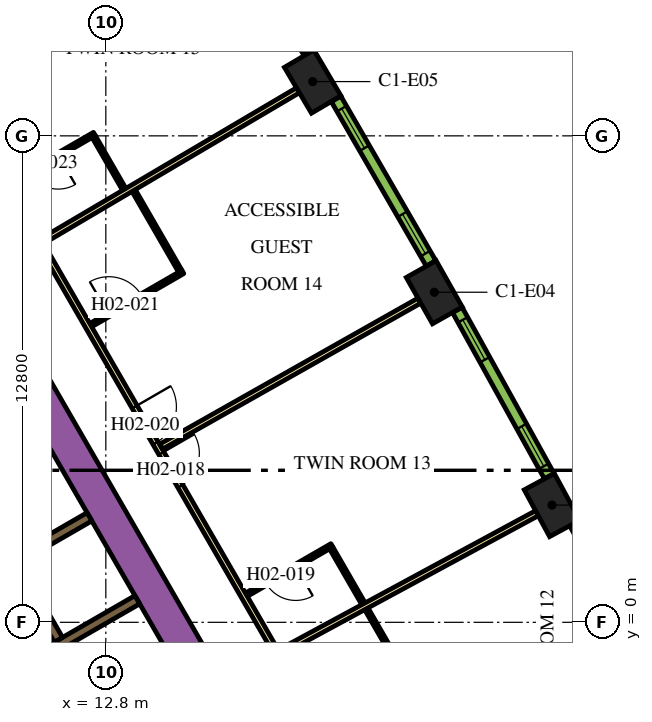
"""IFC4 building model, lengths in metres.
Left out: names, types, materials, properties, quantities, classifications, styles, units other than length and angle.
Written with IfcOpenShell. Run it as: python <this file> out.ifc"""

import sys

from ifc_helpers import new_model, si_unit, direction, frame, frame_2d, origin, origin_2d, place, context, subcontext, project, spatial, rectangle, extrude, element, fill, save


model = new_model("IFC4")
c1 = context("Model", 3, precision=1e-05, world=origin(), true_north=direction((0.0, 1.0)))
c2 = subcontext(c1, "Body", "Model", "MODEL_VIEW")
j1 = project(units=[si_unit("LENGTHUNIT", "METRE"), si_unit("PLANEANGLEUNIT", "RADIAN")], contexts=[c1])
p1 = place(None, origin())
s1 = spatial("IfcSite", under=j1, at=p1, CompositionType="ELEMENT")
p2 = place(p1, origin())
s2 = spatial("IfcBuilding", under=s1, at=p2, CompositionType="ELEMENT")
p3 = place(p2, frame((0.0, 0.0, 47.1)))
s3 = spatial("IfcBuildingStorey", under=s2, at=p3, CompositionType="ELEMENT", Elevation=47.1)
for number, where, z_axis, x_axis in (
    (1, (24.54, 3.085, 0.0), (0.0, 0.0, 1.0), (-0.476, 0.88, 0.0)),
    (2, (21.443, 8.685, 0.0), (0.0, 0.0, 1.0), (-0.492, 0.871, 0.0)),
    (3, (18.243, 14.228, 0.0), (0.0, 0.0, 1.0), (-0.508, 0.861, 0.0)),
):
    element("IfcColumn", number, at=place(p3, frame(where, z_axis=z_axis, x_axis=x_axis)), inside=s3, PredefinedType="COLUMN", context=c2, shape_type="SweptSolid", body=[
        extrude(rectangle(XDim=1.4, YDim=0.9, at=origin_2d()), origin(), (0.0, 0.0, 1.0), 3.9),
    ])
p4 = place(p3, frame((6.776, 13.364, 0.0), z_axis=(0.0, 0.0, 1.0), x_axis=(0.500004177138, -0.8660229921, 0.0)))
e4 = element("IfcWall", 4, at=p4, inside=s3, PredefinedType="SOLIDWALL", context=c2, shape_type="SweptSolid", body=[
    extrude(rectangle(XDim=20.204, YDim=0.9, at=frame_2d((10.102, 0.0))), origin(), (0.0, 0.0, 1.0), 3.9),
])
p5 = place(p3, frame((10.464, 1.677, 0.0), z_axis=(0.0, 0.0, 1.0), x_axis=(0.86605622881, 0.499946605688, 0.0)))
e5 = element("IfcWall", 5, at=p5, inside=s3, PredefinedType="SOLIDWALL", context=c2, shape_type="SweptSolid", body=[
    extrude(rectangle(XDim=2.2, YDim=0.25, at=frame_2d((1.1, 0.0))), origin(), (0.0, 0.0, 1.0), 3.9),
])
p6 = place(p3, frame((13.629, 0.594, 0.0), z_axis=(0.0, 0.0, 1.0), x_axis=(-0.86602790099, -0.499995674689, 0.0)))
e6 = element("IfcWall", 6, at=p6, inside=s3, PredefinedType="SOLIDWALL", context=c2, shape_type="SweptSolid", body=[
    extrude(rectangle(XDim=3.146, YDim=0.25, at=frame_2d((1.573, 0.0))), origin(), (0.0, 0.0, 1.0), 3.9),
])
p7 = place(p3, frame((11.553, -0.46, 0.0), z_axis=(0.0, 0.0, 1.0), x_axis=(-0.500006514828, 0.866021642414, 0.0)))
e7 = element("IfcWall", 7, at=p7, inside=s3, PredefinedType="SOLIDWALL", context=c2, shape_type="SweptSolid", body=[
    extrude(rectangle(XDim=12.35, YDim=0.25, at=frame_2d((6.175, 0.0))), origin(), (0.0, 0.0, 1.0), 3.9),
])
p8 = place(p7, frame((0.585, 0.0, 0.0)))
e8 = element("IfcOpeningElement", 8, at=p8, cuts=e7, PredefinedType="OPENING", context=c2, shape_type="SweptSolid", body=[
    extrude(rectangle(XDim=1.1, YDim=2.1, at=frame_2d((0.55, 1.05))), frame((0.0, 0.135, 0.0), z_axis=(0.0, -1.0, 0.0), x_axis=(1.0, 0.0, 0.0)), (0.0, 0.0, 1.0), 0.27),
])
p9 = place(p7, frame((3.105, 0.0, 0.0)))
e9 = element("IfcOpeningElement", 9, at=p9, cuts=e7, PredefinedType="OPENING", context=c2, shape_type="SweptSolid", body=[
    extrude(rectangle(XDim=1.1, YDim=2.1, at=frame_2d((0.55, 1.05))), frame((0.0, 0.135, 0.0), z_axis=(0.0, -1.0, 0.0), x_axis=(1.0, 0.0, 0.0)), (0.0, 0.0, 1.0), 0.27),
])
p10 = place(p7, frame((5.625, 0.0, 0.0)))
e10 = element("IfcOpeningElement", 10, at=p10, cuts=e7, PredefinedType="OPENING", context=c2, shape_type="SweptSolid", body=[
    extrude(rectangle(XDim=1.1, YDim=2.1, at=frame_2d((0.55, 1.05))), frame((0.0, 0.135, 0.0), z_axis=(0.0, -1.0, 0.0), x_axis=(1.0, 0.0, 0.0)), (0.0, 0.0, 1.0), 0.27),
])
p11 = place(p3, frame((6.163, 18.475, 0.0), z_axis=(0.0, 0.0, 1.0), x_axis=(0.500001317485, -0.866024643133, 0.0)))
e11 = element("IfcWall", 11, at=p11, inside=s3, PredefinedType="PARTITIONING", context=c2, shape_type="SweptSolid", body=[
    extrude(rectangle(XDim=25.767, YDim=0.15, at=frame_2d((12.883, 0.0))), origin(), (0.0, 0.0, 1.0), 2.75),
])
p12 = place(p11, frame((24.586, 0.0, 0.0)))
e12 = element("IfcOpeningElement", 12, at=p12, cuts=e11, PredefinedType="OPENING", context=c2, shape_type="SweptSolid", body=[
    extrude(rectangle(XDim=1.0, YDim=2.1, at=frame_2d((0.5, 1.05))), frame((0.0, 0.085, 0.0), z_axis=(0.0, -1.0, 0.0), x_axis=(1.0, 0.0, 0.0)), (0.0, 0.0, 1.0), 0.17),
])
p13 = place(p11, frame((16.196, 0.0, 0.0)))
e13 = element("IfcOpeningElement", 13, at=p13, cuts=e11, PredefinedType="OPENING", context=c2, shape_type="SweptSolid", body=[
    extrude(rectangle(XDim=1.0, YDim=2.1, at=frame_2d((0.5, 1.05))), frame((0.0, 0.085, 0.0), z_axis=(0.0, -1.0, 0.0), x_axis=(1.0, 0.0, 0.0)), (0.0, 0.0, 1.0), 0.17),
])
p14 = place(p11, frame((14.789, 0.0, 0.0)))
e14 = element("IfcOpeningElement", 14, at=p14, cuts=e11, PredefinedType="OPENING", context=c2, shape_type="SweptSolid", body=[
    extrude(rectangle(XDim=1.1, YDim=2.1, at=frame_2d((0.55, 1.05))), frame((0.0, 0.085, 0.0), z_axis=(0.0, -1.0, 0.0), x_axis=(1.0, 0.0, 0.0)), (0.0, 0.0, 1.0), 0.17),
])
p15 = place(p11, frame((3.698, 0.0, 0.0)))
e15 = element("IfcOpeningElement", 15, at=p15, cuts=e11, PredefinedType="OPENING", context=c2, shape_type="SweptSolid", body=[
    extrude(rectangle(XDim=1.0, YDim=2.1, at=frame_2d((0.5, 1.05))), frame((0.0, 0.085, 0.0), z_axis=(0.0, -1.0, 0.0), x_axis=(1.0, 0.0, 0.0)), (0.0, 0.0, 1.0), 0.17),
])
p16 = place(p11, frame((2.391, 0.0, 0.0)))
e16 = element("IfcOpeningElement", 16, at=p16, cuts=e11, PredefinedType="OPENING", context=c2, shape_type="SweptSolid", body=[
    extrude(rectangle(XDim=1.0, YDim=2.1, at=frame_2d((0.5, 1.05))), frame((0.0, 0.085, 0.0), z_axis=(0.0, -1.0, 0.0), x_axis=(1.0, 0.0, 0.0)), (0.0, 0.0, 1.0), 0.17),
])
p17 = place(p3, frame((17.856, 13.999, 0.0), z_axis=(0.0, 0.0, 1.0), x_axis=(-0.861371519381, -0.507975497047, 0.0)))
e17 = element("IfcWall", 17, at=p17, inside=s3, PredefinedType="PARTITIONING", context=c2, shape_type="SweptSolid", body=[
    extrude(rectangle(XDim=7.804, YDim=0.15, at=frame_2d((3.902, 0.0))), origin(), (0.0, 0.0, 1.0), 2.75),
])
p18 = place(p3, frame((21.052, 8.464, 0.0), z_axis=(0.0, 0.0, 1.0), x_axis=(-0.87059371954, -0.492002617368, 0.0)))
e18 = element("IfcWall", 18, at=p18, inside=s3, PredefinedType="PARTITIONING", context=c2, shape_type="SweptSolid", body=[
    extrude(rectangle(XDim=7.803, YDim=0.15, at=frame_2d((3.902, 0.0))), origin(), (0.0, 0.0, 1.0), 2.75),
])
p19 = place(p3, frame((24.145, 2.871, 0.0), z_axis=(0.0, 0.0, 1.0), x_axis=(-0.879551725039, -0.475803281809, 0.0)))
e19 = element("IfcWall", 19, at=p19, inside=s3, PredefinedType="PARTITIONING", context=c2, shape_type="SweptSolid", body=[
    extrude(rectangle(XDim=7.688, YDim=0.15, at=frame_2d((3.844, 0.0))), origin(), (0.0, 0.0, 1.0), 2.75),
])
p20 = place(p3, frame((20.434, -0.993, 0.0), z_axis=(0.0, 0.0, 1.0), x_axis=(-0.500086022567, 0.865975732936, 0.0)))
e20 = element("IfcWall", 20, at=p20, inside=s3, PredefinedType="PARTITIONING", context=c2, shape_type="SweptSolid", body=[
    extrude(rectangle(XDim=1.55, YDim=0.1, at=frame_2d((0.775, 0.0))), origin(), (0.0, 0.0, 1.0), 2.75),
])
p21 = place(p3, frame((18.749, 2.026, 0.0), z_axis=(0.0, 0.0, 1.0), x_axis=(-0.866021400173, -0.500006934395, 0.0)))
e21 = element("IfcWall", 21, at=p21, inside=s3, PredefinedType="PARTITIONING", context=c2, shape_type="SweptSolid", body=[
    extrude(rectangle(XDim=2.6, YDim=0.1, at=frame_2d((1.3, 0.0))), origin(), (0.0, 0.0, 1.0), 2.75),
])
p22 = place(p21, frame((1.1, 0.0, 0.0)))
e22 = element("IfcOpeningElement", 22, at=p22, cuts=e21, PredefinedType="OPENING", context=c2, shape_type="SweptSolid", body=[
    extrude(rectangle(XDim=0.9, YDim=2.1, at=frame_2d((0.45, 1.05))), frame((0.0, 0.06, 0.0), z_axis=(0.0, -1.0, 0.0), x_axis=(1.0, 0.0, 0.0)), (0.0, 0.0, 1.0), 0.12),
])
p23 = place(p3, frame((18.731, 1.958, 0.0), z_axis=(0.0, 0.0, 1.0), x_axis=(0.499976720371, -0.866038843867, 0.0)))
e23 = element("IfcWall", 23, at=p23, inside=s3, PredefinedType="PARTITIONING", context=c2, shape_type="SweptSolid", body=[
    extrude(rectangle(XDim=1.69, YDim=0.1, at=frame_2d((0.845, 0.0))), origin(), (0.0, 0.0, 1.0), 2.75),
])
p24 = place(p3, frame((12.402, 7.819, 0.0), z_axis=(0.0, 0.0, 1.0), x_axis=(0.866034573852, 0.49998411664, 0.0)))
e24 = element("IfcWall", 24, at=p24, inside=s3, PredefinedType="PARTITIONING", context=c2, shape_type="SweptSolid", body=[
    extrude(rectangle(XDim=2.8, YDim=0.1, at=frame_2d((1.4, 0.0))), origin(), (0.0, 0.0, 1.0), 2.75),
])
p25 = place(p24, frame((0.55, 0.0, 0.0)))
e25 = element("IfcOpeningElement", 25, at=p25, cuts=e24, PredefinedType="OPENING", context=c2, shape_type="SweptSolid", body=[
    extrude(rectangle(XDim=1.0, YDim=2.1, at=frame_2d((0.5, 1.05))), frame((0.0, 0.06, 0.0), z_axis=(0.0, -1.0, 0.0), x_axis=(1.0, 0.0, 0.0)), (0.0, 0.0, 1.0), 0.12),
])
p26 = place(p3, frame((14.759, 9.237, 0.0), z_axis=(0.0, 0.0, 1.0), x_axis=(-0.499943856944, 0.866057815567, 0.0)))
e26 = element("IfcWall", 26, at=p26, inside=s3, PredefinedType="PARTITIONING", context=c2, shape_type="SweptSolid", body=[
    extrude(rectangle(XDim=2.45, YDim=0.1, at=frame_2d((1.225, 0.0))), origin(), (0.0, 0.0, 1.0), 2.75),
])
p27 = place(p3, frame((12.5, 12.849, 0.0), z_axis=(0.0, 0.0, 1.0), x_axis=(-0.866021400173, -0.500006934395, 0.0)))
e27 = element("IfcWall", 27, at=p27, inside=s3, PredefinedType="PARTITIONING", context=c2, shape_type="SweptSolid", body=[
    extrude(rectangle(XDim=2.6, YDim=0.1, at=frame_2d((1.3, 0.0))), origin(), (0.0, 0.0, 1.0), 2.75),
])
p28 = place(p27, frame((1.1, 0.0, 0.0)))
e28 = element("IfcOpeningElement", 28, at=p28, cuts=e27, PredefinedType="OPENING", context=c2, shape_type="SweptSolid", body=[
    extrude(rectangle(XDim=0.9, YDim=2.1, at=frame_2d((0.45, 1.05))), frame((0.0, 0.06, 0.0), z_axis=(0.0, -1.0, 0.0), x_axis=(1.0, 0.0, 0.0)), (0.0, 0.0, 1.0), 0.12),
])
p29 = place(p3, frame((12.482, 12.781, 0.0), z_axis=(0.0, 0.0, 1.0), x_axis=(0.500061482766, -0.865989903783, 0.0)))
e29 = element("IfcWall", 29, at=p29, inside=s3, PredefinedType="PARTITIONING", context=c2, shape_type="SweptSolid", body=[
    extrude(rectangle(XDim=1.6, YDim=0.1, at=frame_2d((0.8, 0.0))), origin(), (0.0, 0.0, 1.0), 2.75),
])
p30 = place(p3, frame((27.475, -1.81, 0.0), z_axis=(0.0, 0.0, 1.0), x_axis=(-0.467629620899, 0.883924509026, 0.0)))
e30 = element("IfcWall", 30, at=p30, inside=s3, PredefinedType="SOLIDWALL", context=c2, shape_type="SweptSolid", body=[
    extrude(rectangle(XDim=4.998, YDim=0.29, at=frame_2d((2.499, 0.0))), origin(), (0.0, 0.0, 1.0), 3.65),
])
p31 = place(p30, frame((0.297, 0.0, 0.9)))
e31 = element("IfcOpeningElement", 31, at=p31, cuts=e30, PredefinedType="OPENING", context=c2, shape_type="SweptSolid", body=[
    extrude(rectangle(XDim=1.2, YDim=2.15, at=frame_2d((0.6, 1.075))), frame((0.0, 0.155, 0.0), z_axis=(0.0, -1.0, 0.0), x_axis=(1.0, 0.0, 0.0)), (0.0, 0.0, 1.0), 0.31),
])
p32 = place(p30, frame((3.501, 0.0, 0.9)))
e32 = element("IfcOpeningElement", 32, at=p32, cuts=e30, PredefinedType="OPENING", context=c2, shape_type="SweptSolid", body=[
    extrude(rectangle(XDim=1.2, YDim=2.15, at=frame_2d((0.6, 1.075))), frame((0.0, 0.155, 0.0), z_axis=(0.0, -1.0, 0.0), x_axis=(1.0, 0.0, 0.0)), (0.0, 0.0, 1.0), 0.31),
])
p33 = place(p3, frame((24.468, 3.846, 0.0), z_axis=(0.0, 0.0, 1.0), x_axis=(-0.483912572871, 0.875116347589, 0.0)))
e33 = element("IfcWall", 33, at=p33, inside=s3, PredefinedType="SOLIDWALL", context=c2, shape_type="SweptSolid", body=[
    extrude(rectangle(XDim=4.998, YDim=0.29, at=frame_2d((2.499, 0.0))), origin(), (0.0, 0.0, 1.0), 3.65),
])
p34 = place(p33, frame((0.297, 0.0, 0.9)))
e34 = element("IfcOpeningElement", 34, at=p34, cuts=e33, PredefinedType="OPENING", context=c2, shape_type="SweptSolid", body=[
    extrude(rectangle(XDim=1.2, YDim=2.15, at=frame_2d((0.6, 1.075))), frame((0.0, 0.155, 0.0), z_axis=(0.0, -1.0, 0.0), x_axis=(1.0, 0.0, 0.0)), (0.0, 0.0, 1.0), 0.31),
])
p35 = place(p33, frame((3.501, 0.0, 0.9)))
e35 = element("IfcOpeningElement", 35, at=p35, cuts=e33, PredefinedType="OPENING", context=c2, shape_type="SweptSolid", body=[
    extrude(rectangle(XDim=1.2, YDim=2.15, at=frame_2d((0.6, 1.075))), frame((0.0, 0.155, 0.0), z_axis=(0.0, -1.0, 0.0), x_axis=(1.0, 0.0, 0.0)), (0.0, 0.0, 1.0), 0.31),
])
p36 = place(p3, frame((21.357, 9.445, 0.0), z_axis=(0.0, 0.0, 1.0), x_axis=(-0.50002123722, 0.866013142123, 0.0)))
e36 = element("IfcWall", 36, at=p36, inside=s3, PredefinedType="SOLIDWALL", context=c2, shape_type="SweptSolid", body=[
    extrude(rectangle(XDim=4.998, YDim=0.29, at=frame_2d((2.499, 0.0))), origin(), (0.0, 0.0, 1.0), 3.65),
])
p37 = place(p36, frame((0.297, 0.0, 0.9)))
e37 = element("IfcOpeningElement", 37, at=p37, cuts=e36, PredefinedType="OPENING", context=c2, shape_type="SweptSolid", body=[
    extrude(rectangle(XDim=1.2, YDim=2.15, at=frame_2d((0.6, 1.075))), frame((0.0, 0.155, 0.0), z_axis=(0.0, -1.0, 0.0), x_axis=(1.0, 0.0, 0.0)), (0.0, 0.0, 1.0), 0.31),
])
p38 = place(p36, frame((3.501, 0.0, 0.9)))
e38 = element("IfcOpeningElement", 38, at=p38, cuts=e36, PredefinedType="OPENING", context=c2, shape_type="SweptSolid", body=[
    extrude(rectangle(XDim=1.2, YDim=2.15, at=frame_2d((0.6, 1.075))), frame((0.0, 0.155, 0.0), z_axis=(0.0, -1.0, 0.0), x_axis=(1.0, 0.0, 0.0)), (0.0, 0.0, 1.0), 0.31),
])
p39 = place(p3, frame((18.143, 14.986, 0.0), z_axis=(0.0, 0.0, 1.0), x_axis=(-0.515938796285, 0.856625448191, 0.0)))
e39 = element("IfcWall", 39, at=p39, inside=s3, PredefinedType="SOLIDWALL", context=c2, shape_type="SweptSolid", body=[
    extrude(rectangle(XDim=4.998, YDim=0.29, at=frame_2d((2.499, 0.0))), origin(), (0.0, 0.0, 1.0), 3.65),
])
p40 = place(p39, frame((0.297, 0.0, 0.9)))
e40 = element("IfcOpeningElement", 40, at=p40, cuts=e39, PredefinedType="OPENING", context=c2, shape_type="SweptSolid", body=[
    extrude(rectangle(XDim=1.2, YDim=2.15, at=frame_2d((0.6, 1.075))), frame((0.0, 0.155, 0.0), z_axis=(0.0, -1.0, 0.0), x_axis=(1.0, 0.0, 0.0)), (0.0, 0.0, 1.0), 0.31),
])
p41 = place(p39, frame((3.501, 0.0, 0.9)))
e41 = element("IfcOpeningElement", 41, at=p41, cuts=e39, PredefinedType="OPENING", context=c2, shape_type="SweptSolid", body=[
    extrude(rectangle(XDim=1.2, YDim=2.15, at=frame_2d((0.6, 1.075))), frame((0.0, 0.155, 0.0), z_axis=(0.0, -1.0, 0.0), x_axis=(1.0, 0.0, 0.0)), (0.0, 0.0, 1.0), 0.31),
])
p42 = place(p13, origin())
e42 = element("IfcDoor", 42, at=p42, inside=s3, OperationType="SINGLE_SWING_LEFT", PredefinedType="DOOR", context=c2, shape_type="SweptSolid", body=[
    extrude(rectangle(XDim=1.0, YDim=2.1, at=frame_2d((0.5, 1.05))), frame((0.0, 0.025, 0.0), z_axis=(0.0, -1.0, 0.0), x_axis=(1.0, 0.0, 0.0)), (0.0, 0.0, 1.0), 0.05),
])
fill(e13, e42)
p43 = place(p22, origin())
e43 = element("IfcDoor", 43, at=p43, inside=s3, OperationType="SINGLE_SWING_LEFT", PredefinedType="DOOR", context=c2, shape_type="SweptSolid", body=[
    extrude(rectangle(XDim=0.9, YDim=2.1, at=frame_2d((0.45, 1.05))), frame((0.0, 0.025, 0.0), z_axis=(0.0, -1.0, 0.0), x_axis=(1.0, 0.0, 0.0)), (0.0, 0.0, 1.0), 0.05),
])
fill(e22, e43)
p44 = place(p14, origin())
e44 = element("IfcDoor", 44, at=p44, inside=s3, OperationType="SINGLE_SWING_RIGHT", PredefinedType="DOOR", context=c2, shape_type="SweptSolid", body=[
    extrude(rectangle(XDim=1.1, YDim=2.1, at=frame_2d((0.55, 1.05))), frame((0.0, 0.025, 0.0), z_axis=(0.0, -1.0, 0.0), x_axis=(1.0, 0.0, 0.0)), (0.0, 0.0, 1.0), 0.05),
])
fill(e14, e44)
p45 = place(p25, origin())
e45 = element("IfcDoor", 45, at=p45, inside=s3, OperationType="SINGLE_SWING_LEFT", PredefinedType="DOOR", context=c2, shape_type="SweptSolid", body=[
    extrude(rectangle(XDim=1.0, YDim=2.1, at=frame_2d((0.5, 1.05))), frame((0.0, 0.025, 0.0), z_axis=(0.0, -1.0, 0.0), x_axis=(1.0, 0.0, 0.0)), (0.0, 0.0, 1.0), 0.05),
])
fill(e25, e45)
p46 = place(p28, origin())
e46 = element("IfcDoor", 46, at=p46, inside=s3, OperationType="SINGLE_SWING_RIGHT", PredefinedType="DOOR", context=c2, shape_type="SweptSolid", body=[
    extrude(rectangle(XDim=0.9, YDim=2.1, at=frame_2d((0.45, 1.05))), frame((0.0, 0.025, 0.0), z_axis=(0.0, -1.0, 0.0), x_axis=(1.0, 0.0, 0.0)), (0.0, 0.0, 1.0), 0.05),
])
fill(e28, e46)
p47 = place(p34, origin())
e47 = element("IfcWindow", 47, at=p47, inside=s3, PartitioningType="DOUBLE_PANEL_VERTICAL", PredefinedType="WINDOW", context=c2, shape_type="SweptSolid", body=[
    extrude(rectangle(XDim=1.2, YDim=2.15, at=frame_2d((0.6, 1.075))), frame((0.0, 0.015, 0.0), z_axis=(0.0, -1.0, 0.0), x_axis=(1.0, 0.0, 0.0)), (0.0, 0.0, 1.0), 0.06),
])
fill(e34, e47)
p48 = place(p35, origin())
e48 = element("IfcWindow", 48, at=p48, inside=s3, PartitioningType="DOUBLE_PANEL_VERTICAL", PredefinedType="WINDOW", context=c2, shape_type="SweptSolid", body=[
    extrude(rectangle(XDim=1.2, YDim=2.15, at=frame_2d((0.6, 1.075))), frame((0.0, 0.015, 0.0), z_axis=(0.0, -1.0, 0.0), x_axis=(1.0, 0.0, 0.0)), (0.0, 0.0, 1.0), 0.06),
])
fill(e35, e48)
p49 = place(p37, origin())
e49 = element("IfcWindow", 49, at=p49, inside=s3, PartitioningType="DOUBLE_PANEL_VERTICAL", PredefinedType="WINDOW", context=c2, shape_type="SweptSolid", body=[
    extrude(rectangle(XDim=1.2, YDim=2.15, at=frame_2d((0.6, 1.075))), frame((0.0, 0.015, 0.0), z_axis=(0.0, -1.0, 0.0), x_axis=(1.0, 0.0, 0.0)), (0.0, 0.0, 1.0), 0.06),
])
fill(e37, e49)
p50 = place(p38, origin())
e50 = element("IfcWindow", 50, at=p50, inside=s3, PartitioningType="DOUBLE_PANEL_VERTICAL", PredefinedType="WINDOW", context=c2, shape_type="SweptSolid", body=[
    extrude(rectangle(XDim=1.2, YDim=2.15, at=frame_2d((0.6, 1.075))), frame((0.0, 0.015, 0.0), z_axis=(0.0, -1.0, 0.0), x_axis=(1.0, 0.0, 0.0)), (0.0, 0.0, 1.0), 0.06),
])
fill(e38, e50)
save(model, sys.argv[1])
